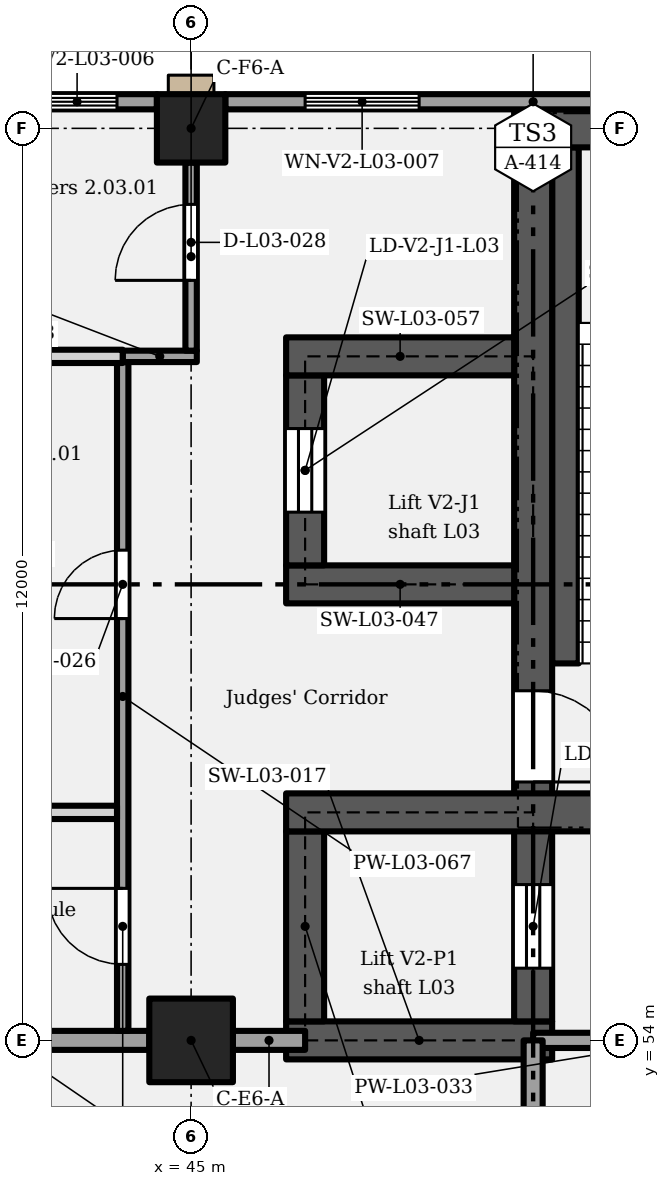
"""IFC4 building model, lengths in metres.
Left out: names, types, materials, properties, quantities, classifications, styles, units other than length and angle.
Written with IfcOpenShell. Run it as: python <this file> out.ifc"""

import sys

from ifc_helpers import new_model, si_unit, direction, frame, frame_2d, origin, origin_2d, place, context, subcontext, project, spatial, rectangle, extrude, element, fill, save


model = new_model("IFC4")
c1 = context("Model", 3, precision=1e-05, world=origin(), true_north=direction((0.0, 1.0)))
c2 = subcontext(c1, "Body", "Model", "MODEL_VIEW")
j1 = project(units=[si_unit("LENGTHUNIT", "METRE"), si_unit("PLANEANGLEUNIT", "RADIAN")], contexts=[c1])
p1 = place(None, origin())
s1 = spatial("IfcSite", under=j1, at=p1, CompositionType="ELEMENT")
p2 = place(p1, origin())
s2 = spatial("IfcBuilding", under=s1, at=p2, CompositionType="ELEMENT")
p3 = place(p2, frame((0.0, 0.0, 17.4)))
s3 = spatial("IfcBuildingStorey", under=s2, at=p3, CompositionType="ELEMENT", Elevation=17.4)
p4 = place(p3, frame((45.0, 54.0, 0.0), z_axis=(0.0, 0.0, 1.0), x_axis=(1.0, 0.0, 0.0)))
e1 = element("IfcColumn", 1, at=p4, inside=s3, PredefinedType="COLUMN", context=c2, shape_type="SweptSolid", body=[
    extrude(rectangle(XDim=1.1, YDim=1.1, at=origin_2d()), origin(), (0.0, 0.0, 1.0), 5.4),
])
p5 = place(p3, frame((45.0, 66.0, 0.0), z_axis=(0.0, 0.0, 1.0), x_axis=(1.0, 0.0, 0.0)))
e2 = element("IfcColumn", 2, at=p5, inside=s3, PredefinedType="COLUMN", context=c2, shape_type="SweptSolid", body=[
    extrude(rectangle(XDim=0.9, YDim=0.9, at=origin_2d()), origin(), (0.0, 0.0, 1.0), 5.4),
])
p6 = place(p3, frame((46.25, 54.0, 0.0), z_axis=(0.0, 0.0, 1.0), x_axis=(1.0, 0.0, 0.0)))
e3 = element("IfcWall", 3, at=p6, inside=s3, PredefinedType="SHEAR", context=c2, shape_type="SweptSolid", body=[
    extrude(rectangle(XDim=3.5, YDim=0.5, at=frame_2d((1.75, 0.0))), origin(), (0.0, 0.0, 1.0), 5.15),
])
p7 = place(p3, frame((46.5, 54.25, 0.0), z_axis=(0.0, 0.0, 1.0), x_axis=(0.0, 1.0, 0.0)))
e4 = element("IfcWall", 4, at=p7, inside=s3, PredefinedType="SHEAR", context=c2, shape_type="SweptSolid", body=[
    extrude(rectangle(XDim=2.5, YDim=0.5, at=frame_2d((1.25, 0.0))), origin(), (0.0, 0.0, 1.0), 5.15),
])
p8 = place(p3, frame((49.5, 54.25, 0.0), z_axis=(0.0, 0.0, 1.0), x_axis=(0.0, 1.0, 0.0)))
e5 = element("IfcWall", 5, at=p8, inside=s3, PredefinedType="SHEAR", context=c2, shape_type="SweptSolid", body=[
    extrude(rectangle(XDim=11.5, YDim=0.5, at=frame_2d((5.75, 0.0))), origin(), (0.0, 0.0, 1.0), 5.15),
])
p9 = place(p8, frame((0.7, 0.0, 0.0)))
e6 = element("IfcOpeningElement", 6, at=p9, cuts=e5, PredefinedType="OPENING", context=c2, shape_type="SweptSolid", body=[
    extrude(rectangle(XDim=1.1, YDim=2.1, at=frame_2d((0.55, 1.05))), frame((0.0, 0.26, 0.0), z_axis=(0.0, -1.0, 0.0), x_axis=(1.0, 0.0, 0.0)), (0.0, 0.0, 1.0), 0.52),
])
p10 = place(p8, frame((4.35, 0.0, 0.0), z_axis=(0.0, 0.0, 1.0), x_axis=(-1.0, 0.0, 0.0)))
e7 = element("IfcOpeningElement", 7, at=p10, cuts=e5, PredefinedType="OPENING", context=c2, shape_type="SweptSolid", body=[
    extrude(rectangle(XDim=1.2, YDim=2.1, at=frame_2d((0.6, 1.05))), frame((0.0, 0.26, 0.0), z_axis=(0.0, -1.0, 0.0), x_axis=(1.0, 0.0, 0.0)), (0.0, 0.0, 1.0), 0.52),
])
p11 = place(p3, frame((46.25, 57.0, 0.0), z_axis=(0.0, 0.0, 1.0), x_axis=(1.0, 0.0, 0.0)))
e8 = element("IfcWall", 8, at=p11, inside=s3, PredefinedType="SHEAR", context=c2, shape_type="SweptSolid", body=[
    extrude(rectangle(XDim=11.0, YDim=0.5, at=frame_2d((5.5, 0.0))), origin(), (0.0, 0.0, 1.0), 5.15),
])
p12 = place(p11, frame((4.9, 0.0, 0.0)))
e9 = element("IfcOpeningElement", 9, at=p12, cuts=e8, PredefinedType="OPENING", context=c2, shape_type="SweptSolid", body=[
    extrude(rectangle(XDim=1.2, YDim=2.1, at=frame_2d((0.6, 1.05))), frame((0.0, 0.26, 0.0), z_axis=(0.0, -1.0, 0.0), x_axis=(1.0, 0.0, 0.0)), (0.0, 0.0, 1.0), 0.52),
])
p13 = place(p3, frame((46.25, 60.0, 0.0), z_axis=(0.0, 0.0, 1.0), x_axis=(1.0, 0.0, 0.0)))
e10 = element("IfcWall", 10, at=p13, inside=s3, PredefinedType="SHEAR", context=c2, shape_type="SweptSolid", body=[
    extrude(rectangle(XDim=3.0, YDim=0.5, at=frame_2d((1.5, 0.0))), origin(), (0.0, 0.0, 1.0), 5.15),
])
p14 = place(p3, frame((46.5, 60.25, 0.0), z_axis=(0.0, 0.0, 1.0), x_axis=(0.0, 1.0, 0.0)))
e11 = element("IfcWall", 11, at=p14, inside=s3, PredefinedType="SHEAR", context=c2, shape_type="SweptSolid", body=[
    extrude(rectangle(XDim=2.5, YDim=0.5, at=frame_2d((1.25, 0.0))), origin(), (0.0, 0.0, 1.0), 5.15),
])
p15 = place(p14, frame((0.7, 0.0, 0.0)))
e12 = element("IfcOpeningElement", 12, at=p15, cuts=e11, PredefinedType="OPENING", context=c2, shape_type="SweptSolid", body=[
    extrude(rectangle(XDim=1.1, YDim=2.1, at=frame_2d((0.55, 1.05))), frame((0.0, 0.26, 0.0), z_axis=(0.0, -1.0, 0.0), x_axis=(1.0, 0.0, 0.0)), (0.0, 0.0, 1.0), 0.52),
])
p16 = place(p3, frame((46.25, 63.0, 0.0), z_axis=(0.0, 0.0, 1.0), x_axis=(1.0, 0.0, 0.0)))
e13 = element("IfcWall", 13, at=p16, inside=s3, PredefinedType="SHEAR", context=c2, shape_type="SweptSolid", body=[
    extrude(rectangle(XDim=3.0, YDim=0.5, at=frame_2d((1.5, 0.0))), origin(), (0.0, 0.0, 1.0), 5.15),
])
p17 = place(p3, frame((49.25, 66.0, 0.0), z_axis=(0.0, 0.0, 1.0), x_axis=(1.0, 0.0, 0.0)))
e14 = element("IfcWall", 14, at=p17, inside=s3, PredefinedType="SHEAR", context=c2, shape_type="SweptSolid", body=[
    extrude(rectangle(XDim=4.3, YDim=0.5, at=frame_2d((2.15, 0.0))), origin(), (0.0, 0.0, 1.0), 5.15),
])
p18 = place(p3, frame((36.45, 66.35, 0.0), z_axis=(0.0, 0.0, 1.0), x_axis=(1.0, 0.0, 0.0)))
e15 = element("IfcWall", 15, at=p18, inside=s3, PredefinedType="SOLIDWALL", context=c2, shape_type="SweptSolid", body=[
    extrude(rectangle(XDim=8.1, YDim=0.2, at=frame_2d((4.05, 0.0))), origin(), (0.0, 0.0, 1.0), 5.15),
])
p19 = place(p18, frame((6.525, 0.0, 1.05)))
e16 = element("IfcOpeningElement", 16, at=p19, cuts=e15, PredefinedType="OPENING", context=c2, shape_type="SweptSolid", body=[
    extrude(rectangle(XDim=1.05, YDim=2.4, at=frame_2d((0.525, 1.2))), frame((0.0, 0.11, 0.0), z_axis=(0.0, -1.0, 0.0), x_axis=(1.0, 0.0, 0.0)), (0.0, 0.0, 1.0), 0.22),
])
p20 = place(p3, frame((45.45, 66.35, 0.0), z_axis=(0.0, 0.0, 1.0), x_axis=(1.0, 0.0, 0.0)))
e17 = element("IfcWall", 17, at=p20, inside=s3, PredefinedType="SOLIDWALL", context=c2, shape_type="SweptSolid", body=[
    extrude(rectangle(XDim=8.1, YDim=0.2, at=frame_2d((4.05, 0.0))), origin(), (0.0, 0.0, 1.0), 5.15),
])
p21 = place(p20, frame((1.05, 0.0, 1.05)))
e18 = element("IfcOpeningElement", 18, at=p21, cuts=e17, PredefinedType="OPENING", context=c2, shape_type="SweptSolid", body=[
    extrude(rectangle(XDim=1.5, YDim=3.5, at=frame_2d((0.75, 1.75))), frame((0.0, 0.11, 0.0), z_axis=(0.0, -1.0, 0.0), x_axis=(1.0, 0.0, 0.0)), (0.0, 0.0, 1.0), 0.22),
])
p22 = place(p3, frame((40.5, 54.0, 0.0), z_axis=(0.0, 0.0, 1.0), x_axis=(1.0, 0.0, 0.0)))
e19 = element("IfcWall", 19, at=p22, inside=s3, PredefinedType="PARTITIONING", context=c2, shape_type="SweptSolid", body=[
    extrude(rectangle(XDim=3.95, YDim=0.25, at=frame_2d((1.975, 0.0))), origin(), (0.0, 0.0, 1.0), 4.4),
])
p23 = place(p22, frame((2.3, 0.0, 0.0), z_axis=(0.0, 0.0, 1.0), x_axis=(-1.0, 0.0, 0.0)))
e20 = element("IfcOpeningElement", 20, at=p23, cuts=e19, PredefinedType="OPENING", context=c2, shape_type="SweptSolid", body=[
    extrude(rectangle(XDim=1.0, YDim=2.1, at=frame_2d((0.5, 1.05))), frame((0.0, 0.135, 0.0), z_axis=(0.0, -1.0, 0.0), x_axis=(1.0, 0.0, 0.0)), (0.0, 0.0, 1.0), 0.27),
])
p24 = place(p3, frame((45.55, 54.0, 0.0), z_axis=(0.0, 0.0, 1.0), x_axis=(1.0, 0.0, 0.0)))
e21 = element("IfcWall", 21, at=p24, inside=s3, PredefinedType="PARTITIONING", context=c2, shape_type="SweptSolid", body=[
    extrude(rectangle(XDim=0.95, YDim=0.25, at=frame_2d((0.475, 0.0))), origin(), (0.0, 0.0, 1.0), 4.4),
])
p25 = place(p3, frame((49.5, 54.0, 0.0), z_axis=(0.0, 0.0, 1.0), x_axis=(1.0, 0.0, 0.0)))
e22 = element("IfcWall", 22, at=p25, inside=s3, PredefinedType="PARTITIONING", context=c2, shape_type="SweptSolid", body=[
    extrude(rectangle(XDim=3.95, YDim=0.2, at=frame_2d((1.975, 0.0))), origin(), (0.0, 0.0, 1.0), 4.4),
])
p26 = place(p25, frame((1.35, 0.0, 0.0)))
e23 = element("IfcOpeningElement", 23, at=p26, cuts=e22, PredefinedType="OPENING", context=c2, shape_type="SweptSolid", body=[
    extrude(rectangle(XDim=1.8, YDim=2.1, at=frame_2d((0.9, 1.05))), frame((0.0, 0.11, 0.0), z_axis=(0.0, -1.0, 0.0), x_axis=(1.0, 0.0, 0.0)), (0.0, 0.0, 1.0), 0.22),
])
p27 = place(p3, frame((40.75, 57.0, 0.0), z_axis=(0.0, 0.0, 1.0), x_axis=(1.0, 0.0, 0.0)))
e24 = element("IfcWall", 24, at=p27, inside=s3, PredefinedType="PARTITIONING", context=c2, shape_type="SweptSolid", body=[
    extrude(rectangle(XDim=3.275, YDim=0.175, at=frame_2d((1.637, 0.0))), origin(), (0.0, 0.0, 1.0), 5.15),
])
p28 = place(p27, frame((2.0, 0.0, 0.0), z_axis=(0.0, 0.0, 1.0), x_axis=(-1.0, 0.0, 0.0)))
e25 = element("IfcOpeningElement", 25, at=p28, cuts=e24, PredefinedType="OPENING", context=c2, shape_type="SweptSolid", body=[
    extrude(rectangle(XDim=0.9, YDim=2.1, at=frame_2d((0.45, 1.05))), frame((0.0, 0.097, 0.0), z_axis=(0.0, -1.0, 0.0), x_axis=(1.0, 0.0, 0.0)), (0.0, 0.0, 1.0), 0.195),
])
p29 = place(p3, frame((40.75, 63.0, 0.0), z_axis=(0.0, 0.0, 1.0), x_axis=(1.0, 0.0, 0.0)))
e26 = element("IfcWall", 26, at=p29, inside=s3, PredefinedType="PARTITIONING", context=c2, shape_type="SweptSolid", body=[
    extrude(rectangle(XDim=3.35, YDim=0.175, at=frame_2d((1.675, 0.0))), origin(), (0.0, 0.0, 1.0), 5.15),
])
p30 = place(p3, frame((44.1, 63.0, 0.0), z_axis=(0.0, 0.0, 1.0), x_axis=(1.0, 0.0, 0.0)))
e27 = element("IfcWall", 27, at=p30, inside=s3, PredefinedType="PARTITIONING", context=c2, shape_type="SweptSolid", body=[
    extrude(rectangle(XDim=0.975, YDim=0.15, at=frame_2d((0.487, 0.0))), origin(), (0.0, 0.0, 1.0), 5.15),
])
p31 = place(p3, frame((44.1, 54.125, 0.0), z_axis=(0.0, 0.0, 1.0), x_axis=(0.0, 1.0, 0.0)))
e28 = element("IfcWall", 28, at=p31, inside=s3, PredefinedType="PARTITIONING", context=c2, shape_type="SweptSolid", body=[
    extrude(rectangle(XDim=8.8, YDim=0.15, at=frame_2d((4.4, 0.0))), origin(), (0.0, 0.0, 1.0), 5.15),
])
p32 = place(p31, frame((0.875, 0.0, 0.0)))
e29 = element("IfcOpeningElement", 29, at=p32, cuts=e28, PredefinedType="OPENING", context=c2, shape_type="SweptSolid", body=[
    extrude(rectangle(XDim=1.0, YDim=2.1, at=frame_2d((0.5, 1.05))), frame((0.0, 0.085, 0.0), z_axis=(0.0, -1.0, 0.0), x_axis=(1.0, 0.0, 0.0)), (0.0, 0.0, 1.0), 0.17),
])
p33 = place(p31, frame((5.425, 0.0, 0.0)))
e30 = element("IfcOpeningElement", 30, at=p33, cuts=e28, PredefinedType="OPENING", context=c2, shape_type="SweptSolid", body=[
    extrude(rectangle(XDim=0.9, YDim=2.1, at=frame_2d((0.45, 1.05))), frame((0.0, 0.085, 0.0), z_axis=(0.0, -1.0, 0.0), x_axis=(1.0, 0.0, 0.0)), (0.0, 0.0, 1.0), 0.17),
])
p34 = place(p3, frame((45.0, 63.075, 0.0), z_axis=(0.0, 0.0, 1.0), x_axis=(0.0, 1.0, 0.0)))
e31 = element("IfcWall", 31, at=p34, inside=s3, PredefinedType="PARTITIONING", context=c2, shape_type="SweptSolid", body=[
    extrude(rectangle(XDim=2.475, YDim=0.15, at=frame_2d((1.238, 0.0))), origin(), (0.0, 0.0, 1.0), 4.4),
])
p35 = place(p34, frame((0.925, 0.0, 0.0)))
e32 = element("IfcOpeningElement", 32, at=p35, cuts=e31, PredefinedType="OPENING", context=c2, shape_type="SweptSolid", body=[
    extrude(rectangle(XDim=1.0, YDim=2.1, at=frame_2d((0.5, 1.05))), frame((0.0, 0.085, 0.0), z_axis=(0.0, -1.0, 0.0), x_axis=(1.0, 0.0, 0.0)), (0.0, 0.0, 1.0), 0.17),
])
p36 = place(p3, frame((49.5, 43.5, 0.0), z_axis=(0.0, 0.0, 1.0), x_axis=(0.0, 1.0, 0.0)))
e33 = element("IfcWall", 33, at=p36, inside=s3, PredefinedType="PARTITIONING", context=c2, shape_type="SweptSolid", body=[
    extrude(rectangle(XDim=10.5, YDim=0.25, at=frame_2d((5.25, 0.0))), origin(), (0.0, 0.0, 1.0), 5.15),
])
p37 = place(p36, frame((0.6, 0.0, 0.0)))
e34 = element("IfcOpeningElement", 34, at=p37, cuts=e33, PredefinedType="OPENING", context=c2, shape_type="SweptSolid", body=[
    extrude(rectangle(XDim=1.8, YDim=2.4, at=frame_2d((0.9, 1.2))), frame((0.0, 0.135, 0.0), z_axis=(0.0, -1.0, 0.0), x_axis=(1.0, 0.0, 0.0)), (0.0, 0.0, 1.0), 0.27),
])
p38 = place(p36, frame((7.1, 0.0, 0.0)))
e35 = element("IfcOpeningElement", 35, at=p38, cuts=e33, PredefinedType="OPENING", context=c2, shape_type="SweptSolid", body=[
    extrude(rectangle(XDim=1.8, YDim=2.4, at=frame_2d((0.9, 1.2))), frame((0.0, 0.135, 0.0), z_axis=(0.0, -1.0, 0.0), x_axis=(1.0, 0.0, 0.0)), (0.0, 0.0, 1.0), 0.27),
])
p39 = place(p3, frame((49.925, 58.96, 0.0), z_axis=(0.0, 0.0, 1.0), x_axis=(0.0, 1.0, 0.0)))
e36 = element("IfcWall", 36, at=p39, inside=s3, PredefinedType="SHEAR", context=c2, shape_type="SweptSolid", body=[
    extrude(rectangle(XDim=6.79, YDim=0.35, at=frame_2d((3.395, 0.0))), origin(), (0.0, 0.0, 1.0), 2.587),
])
p40 = place(p19, origin())
e37 = element("IfcWindow", 37, at=p40, inside=s3, PartitioningType="SINGLE_PANEL", PredefinedType="WINDOW", context=c2, shape_type="SweptSolid", body=[
    extrude(rectangle(XDim=1.05, YDim=2.4, at=frame_2d((0.525, 1.2))), frame((0.0, 0.03, 0.0), z_axis=(0.0, -1.0, 0.0), x_axis=(1.0, 0.0, 0.0)), (0.0, 0.0, 1.0), 0.06),
])
fill(e16, e37)
p41 = place(p21, origin())
e38 = element("IfcWindow", 38, at=p41, inside=s3, PartitioningType="SINGLE_PANEL", PredefinedType="WINDOW", context=c2, shape_type="SweptSolid", body=[
    extrude(rectangle(XDim=1.5, YDim=3.5, at=frame_2d((0.75, 1.75))), frame((0.0, 0.03, 0.0), z_axis=(0.0, -1.0, 0.0), x_axis=(1.0, 0.0, 0.0)), (0.0, 0.0, 1.0), 0.06),
])
fill(e18, e38)
p42 = place(p9, origin())
e39 = element("IfcDoor", 39, at=p42, inside=s3, OperationType="SLIDING_TO_LEFT", PredefinedType="DOOR", context=c2, shape_type="SweptSolid", body=[
    extrude(rectangle(XDim=1.1, YDim=2.1, at=frame_2d((0.55, 1.05))), frame((0.0, 0.025, 0.0), z_axis=(0.0, -1.0, 0.0), x_axis=(1.0, 0.0, 0.0)), (0.0, 0.0, 1.0), 0.05),
])
fill(e6, e39)
p43 = place(p15, origin())
e40 = element("IfcDoor", 40, at=p43, inside=s3, OperationType="SLIDING_TO_LEFT", PredefinedType="DOOR", context=c2, shape_type="SweptSolid", body=[
    extrude(rectangle(XDim=1.1, YDim=2.1, at=frame_2d((0.55, 1.05))), frame((0.0, 0.025, 0.0), z_axis=(0.0, -1.0, 0.0), x_axis=(1.0, 0.0, 0.0)), (0.0, 0.0, 1.0), 0.05),
])
fill(e12, e40)
p44 = place(p10, origin())
e41 = element("IfcDoor", 41, at=p44, inside=s3, OperationType="SINGLE_SWING_RIGHT", PredefinedType="DOOR", context=c2, shape_type="SweptSolid", body=[
    extrude(rectangle(XDim=1.2, YDim=2.1, at=frame_2d((0.6, 1.05))), frame((0.0, 0.025, 0.0), z_axis=(0.0, -1.0, 0.0), x_axis=(1.0, 0.0, 0.0)), (0.0, 0.0, 1.0), 0.05),
])
fill(e7, e41)
p45 = place(p32, origin())
e42 = element("IfcDoor", 42, at=p45, inside=s3, OperationType="SINGLE_SWING_RIGHT", PredefinedType="DOOR", context=c2, shape_type="SweptSolid", body=[
    extrude(rectangle(XDim=1.0, YDim=2.1, at=frame_2d((0.5, 1.05))), frame((0.0, 0.025, 0.0), z_axis=(0.0, -1.0, 0.0), x_axis=(1.0, 0.0, 0.0)), (0.0, 0.0, 1.0), 0.05),
])
fill(e29, e42)
p46 = place(p33, origin())
e43 = element("IfcDoor", 43, at=p46, inside=s3, OperationType="SINGLE_SWING_LEFT", PredefinedType="DOOR", context=c2, shape_type="SweptSolid", body=[
    extrude(rectangle(XDim=0.9, YDim=2.1, at=frame_2d((0.45, 1.05))), frame((0.0, 0.025, 0.0), z_axis=(0.0, -1.0, 0.0), x_axis=(1.0, 0.0, 0.0)), (0.0, 0.0, 1.0), 0.05),
])
fill(e30, e43)
p47 = place(p35, origin())
e44 = element("IfcDoor", 44, at=p47, inside=s3, OperationType="SINGLE_SWING_LEFT", PredefinedType="DOOR", context=c2, shape_type="SweptSolid", body=[
    extrude(rectangle(XDim=1.0, YDim=2.1, at=frame_2d((0.5, 1.05))), frame((0.0, 0.025, 0.0), z_axis=(0.0, -1.0, 0.0), x_axis=(1.0, 0.0, 0.0)), (0.0, 0.0, 1.0), 0.05),
])
fill(e32, e44)
save(model, sys.argv[1])
